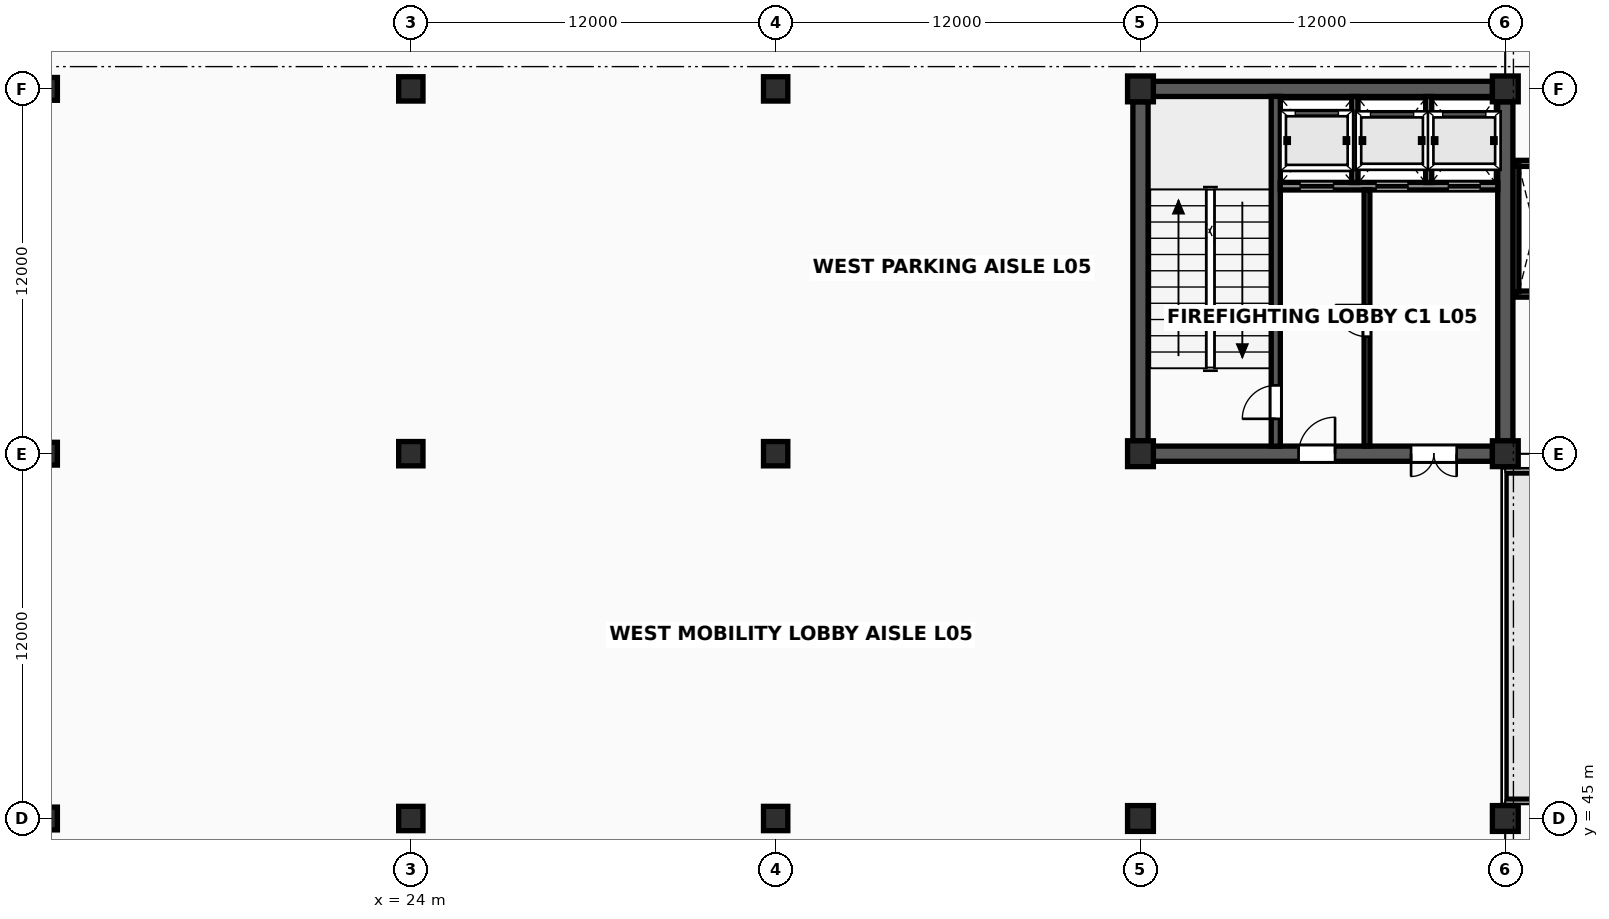
"""IFC4 building model, lengths in metres.
Left out: names, types, materials, properties, quantities, classifications, styles, units other than length and angle.
Written with IfcOpenShell. Run it as: python <this file> out.ifc"""

import sys

from ifc_helpers import new_model, si_unit, direction, frame, frame_2d, origin, origin_2d, place, context, subcontext, project, spatial, rectangle, extrude, element, fill, save


model = new_model("IFC4")
c1 = context("Model", 3, precision=1e-05, world=origin(), true_north=direction((0.0, 1.0)))
c2 = subcontext(c1, "Body", "Model", "MODEL_VIEW")
j1 = project(units=[si_unit("LENGTHUNIT", "METRE"), si_unit("PLANEANGLEUNIT", "RADIAN")], contexts=[c1])
p1 = place(None, origin())
s1 = spatial("IfcSite", under=j1, at=p1, CompositionType="ELEMENT")
p2 = place(p1, origin())
s2 = spatial("IfcBuilding", under=s1, at=p2, CompositionType="ELEMENT")
p3 = place(p2, frame((0.0, 0.0, 21.0)))
s3 = spatial("IfcBuildingStorey", under=s2, at=p3, CompositionType="ELEMENT", Elevation=21.0)
for number, where, z_axis, x_axis in (
    (1, (12.0, 45.0, 0.0), (0.0, 0.0, 1.0), (1.0, 0.0, 0.0)),
    (2, (12.0, 57.0, 0.0), (0.0, 0.0, 1.0), (1.0, 0.0, 0.0)),
    (3, (12.0, 69.0, 0.0), (0.0, 0.0, 1.0), (1.0, 0.0, 0.0)),
):
    element("IfcColumn", number, at=place(p3, frame(where, z_axis=z_axis, x_axis=x_axis)), inside=s3, PredefinedType="COLUMN", context=c2, shape_type="SweptSolid", body=[
        extrude(rectangle(XDim=0.75, YDim=0.75, at=origin_2d()), origin(), (0.0, 0.0, 1.0), 3.8),
    ])
for number, where, z_axis, x_axis in (
    (4, (24.0, 45.0, 0.0), (0.0, 0.0, 1.0), (1.0, 0.0, 0.0)),
    (5, (24.0, 57.0, 0.0), (0.0, 0.0, 1.0), (1.0, 0.0, 0.0)),
    (6, (24.0, 69.0, 0.0), (0.0, 0.0, 1.0), (1.0, 0.0, 0.0)),
    (7, (36.0, 45.0, 0.0), (0.0, 0.0, 1.0), (1.0, 0.0, 0.0)),
    (8, (36.0, 57.0, 0.0), (0.0, 0.0, 1.0), (1.0, 0.0, 0.0)),
    (9, (36.0, 69.0, 0.0), (0.0, 0.0, 1.0), (1.0, 0.0, 0.0)),
):
    element("IfcColumn", number, at=place(p3, frame(where, z_axis=z_axis, x_axis=x_axis)), inside=s3, PredefinedType="COLUMN", context=c2, shape_type="SweptSolid", body=[
        extrude(rectangle(XDim=0.8, YDim=0.8, at=origin_2d()), origin(), (0.0, 0.0, 1.0), 3.8),
    ])
for number, where, z_axis, x_axis in (
    (10, (48.0, 45.0, 0.0), (0.0, 0.0, 1.0), (1.0, 0.0, 0.0)),
    (11, (48.0, 57.0, 0.0), (0.0, 0.0, 1.0), (1.0, 0.0, 0.0)),
    (12, (48.0, 69.0, 0.0), (0.0, 0.0, 1.0), (1.0, 0.0, 0.0)),
    (13, (60.0, 45.0, 0.0), (0.0, 0.0, 1.0), (1.0, 0.0, 0.0)),
    (14, (60.0, 57.0, 0.0), (0.0, 0.0, 1.0), (1.0, 0.0, 0.0)),
    (15, (60.0, 69.0, 0.0), (0.0, 0.0, 1.0), (1.0, 0.0, 0.0)),
):
    element("IfcColumn", number, at=place(p3, frame(where, z_axis=z_axis, x_axis=x_axis)), inside=s3, PredefinedType="COLUMN", context=c2, shape_type="SweptSolid", body=[
        extrude(rectangle(XDim=0.85, YDim=0.85, at=origin_2d()), origin(), (0.0, 0.0, 1.0), 3.8),
    ])
for number, where, z_axis, x_axis in (
    (16, (60.347, 62.25, 0.0), (0.0, 0.0, 1.0), (1.0, 0.0, 0.0)),
    (17, (60.347, 66.55, 0.0), (0.0, 0.0, 1.0), (1.0, 0.0, 0.0)),
):
    element("IfcWall", number, at=place(p3, frame(where, z_axis=z_axis, x_axis=x_axis)), inside=s3, PredefinedType="SOLIDWALL", context=c2, shape_type="SweptSolid", body=[
        extrude(rectangle(XDim=1.233, YDim=0.2, at=frame_2d((0.617, 0.0))), origin(), (0.0, 0.0, 1.0), 3.638),
    ])
p4 = place(p3, frame((60.347, 62.33, 0.0), z_axis=(0.0, 0.0, 1.0), x_axis=(0.0, 1.0, 0.0)))
e18 = element("IfcWall", 18, at=p4, inside=s3, PredefinedType="SOLIDWALL", context=c2, shape_type="SweptSolid", body=[
    extrude(rectangle(XDim=4.14, YDim=0.2, at=frame_2d((2.07, 0.0))), origin(), (0.0, 0.0, 1.0), 3.638),
])
p5 = place(p3, frame((48.422, 57.0, 0.0), z_axis=(0.0, 0.0, 1.0), x_axis=(1.0, 0.0, 0.0)))
e19 = element("IfcWall", 19, at=p5, inside=s3, PredefinedType="SHEAR", context=c2, shape_type="SweptSolid", body=[
    extrude(rectangle(XDim=11.156, YDim=0.5, at=frame_2d((5.578, 0.0))), origin(), (0.0, 0.0, 1.0), 3.638),
])
p6 = place(p5, frame((4.778, 0.0, 0.0)))
e20 = element("IfcOpeningElement", 20, at=p6, cuts=e19, PredefinedType="OPENING", context=c2, shape_type="SweptSolid", body=[
    extrude(rectangle(XDim=1.2, YDim=2.2, at=frame_2d((0.6, 1.1))), frame((0.0, 0.265, 0.0), z_axis=(0.0, -1.0, 0.0), x_axis=(1.0, 0.0, 0.0)), (0.0, 0.0, 1.0), 0.53),
])
p7 = place(p5, frame((8.478, 0.0, 0.0)))
e21 = element("IfcOpeningElement", 21, at=p7, cuts=e19, PredefinedType="OPENING", context=c2, shape_type="SweptSolid", body=[
    extrude(rectangle(XDim=1.5, YDim=2.25, at=frame_2d((0.75, 1.125))), frame((0.0, 0.265, 0.0), z_axis=(0.0, -1.0, 0.0), x_axis=(1.0, 0.0, 0.0)), (0.0, 0.0, 1.0), 0.53),
])
for number, where, z_axis, x_axis in (
    (22, (48.422, 69.0, 0.0), (0.0, 0.0, 1.0), (1.0, 0.0, 0.0)),
    (23, (48.0, 57.422, 0.0), (0.0, 0.0, 1.0), (0.0, 1.0, 0.0)),
    (24, (60.0, 57.422, 0.0), (0.0, 0.0, 1.0), (0.0, 1.0, 0.0)),
):
    element("IfcWall", number, at=place(p3, frame(where, z_axis=z_axis, x_axis=x_axis)), inside=s3, PredefinedType="SHEAR", context=c2, shape_type="SweptSolid", body=[
        extrude(rectangle(XDim=11.156, YDim=0.5, at=frame_2d((5.578, 0.0))), origin(), (0.0, 0.0, 1.0), 3.638),
    ])
p8 = place(p3, frame((52.45, 57.247, 0.0), z_axis=(0.0, 0.0, 1.0), x_axis=(0.0, 1.0, 0.0)))
e25 = element("IfcWall", 25, at=p8, inside=s3, PredefinedType="SHEAR", context=c2, shape_type="SweptSolid", body=[
    extrude(rectangle(XDim=11.506, YDim=0.3, at=frame_2d((5.753, 0.0))), origin(), (0.0, 0.0, 1.0), 3.638),
])
p9 = place(p8, frame((0.9, 0.0, 0.0)))
e26 = element("IfcOpeningElement", 26, at=p9, cuts=e25, PredefinedType="OPENING", context=c2, shape_type="SweptSolid", body=[
    extrude(rectangle(XDim=1.1, YDim=2.2, at=frame_2d((0.55, 1.1))), frame((0.0, 0.165, 0.0), z_axis=(0.0, -1.0, 0.0), x_axis=(1.0, 0.0, 0.0)), (0.0, 0.0, 1.0), 0.33),
])
p10 = place(p3, frame((52.597, 65.8, 0.0), z_axis=(0.0, 0.0, 1.0), x_axis=(1.0, 0.0, 0.0)))
e27 = element("IfcWall", 27, at=p10, inside=s3, PredefinedType="SOLIDWALL", context=c2, shape_type="SweptSolid", body=[
    extrude(rectangle(XDim=7.156, YDim=0.25, at=frame_2d((3.578, 0.0))), origin(), (0.0, 0.0, 1.0), 3.638),
])
p11 = place(p10, frame((0.653, 0.0, 0.0)))
e28 = element("IfcOpeningElement", 28, at=p11, cuts=e27, PredefinedType="OPENING", context=c2, shape_type="SweptSolid", body=[
    extrude(rectangle(XDim=1.1, YDim=2.24, at=frame_2d((0.55, 1.12))), frame((0.0, 0.14, 0.0), z_axis=(0.0, -1.0, 0.0), x_axis=(1.0, 0.0, 0.0)), (0.0, 0.0, 1.0), 0.28),
])
p12 = place(p10, frame((3.153, 0.0, 0.0)))
e29 = element("IfcOpeningElement", 29, at=p12, cuts=e27, PredefinedType="OPENING", context=c2, shape_type="SweptSolid", body=[
    extrude(rectangle(XDim=1.05, YDim=2.2, at=frame_2d((0.525, 1.1))), frame((0.0, 0.14, 0.0), z_axis=(0.0, -1.0, 0.0), x_axis=(1.0, 0.0, 0.0)), (0.0, 0.0, 1.0), 0.28),
])
p13 = place(p10, frame((5.528, 0.0, 0.0)))
e30 = element("IfcOpeningElement", 30, at=p13, cuts=e27, PredefinedType="OPENING", context=c2, shape_type="SweptSolid", body=[
    extrude(rectangle(XDim=1.05, YDim=2.2, at=frame_2d((0.525, 1.1))), frame((0.0, 0.14, 0.0), z_axis=(0.0, -1.0, 0.0), x_axis=(1.0, 0.0, 0.0)), (0.0, 0.0, 1.0), 0.28),
])
for number, where, z_axis, x_axis in (
    (31, (55.05, 65.92, 0.0), (0.0, 0.0, 1.0), (0.0, 1.0, 0.0)),
    (32, (57.48, 65.92, 0.0), (0.0, 0.0, 1.0), (0.0, 1.0, 0.0)),
):
    element("IfcWall", number, at=place(p3, frame(where, z_axis=z_axis, x_axis=x_axis)), inside=s3, PredefinedType="SOLIDWALL", context=c2, shape_type="SweptSolid", body=[
        extrude(rectangle(XDim=2.83, YDim=0.2, at=frame_2d((1.415, 0.0))), origin(), (0.0, 0.0, 1.0), 3.628),
    ])
p14 = place(p3, frame((55.45, 57.25, 0.0), z_axis=(0.0, 0.0, 1.0), x_axis=(0.0, 1.0, 0.0)))
e33 = element("IfcWall", 33, at=p14, inside=s3, PredefinedType="SOLIDWALL", context=c2, shape_type="SweptSolid", body=[
    extrude(rectangle(XDim=8.43, YDim=0.19, at=frame_2d((4.215, 0.0))), origin(), (0.0, 0.0, 1.0), 3.628),
])
p15 = place(p14, frame((3.6, 0.0, 0.0)))
e34 = element("IfcOpeningElement", 34, at=p15, cuts=e33, PredefinedType="OPENING", context=c2, shape_type="SweptSolid", body=[
    extrude(rectangle(XDim=1.04, YDim=2.18, at=frame_2d((0.52, 1.09))), frame((0.0, 0.11, 0.0), z_axis=(0.0, -1.0, 0.0), x_axis=(1.0, 0.0, 0.0)), (0.0, 0.0, 1.0), 0.22),
])
p16 = place(p9, origin())
e35 = element("IfcDoor", 35, at=p16, inside=s3, OperationType="SINGLE_SWING_LEFT", PredefinedType="DOOR", context=c2, shape_type="SweptSolid", body=[
    extrude(rectangle(XDim=1.1, YDim=2.2, at=frame_2d((0.55, 1.1))), frame((0.0, 0.025, 0.0), z_axis=(0.0, -1.0, 0.0), x_axis=(1.0, 0.0, 0.0)), (0.0, 0.0, 1.0), 0.05),
])
fill(e26, e35)
p17 = place(p15, origin())
e36 = element("IfcDoor", 36, at=p17, inside=s3, OperationType="SINGLE_SWING_RIGHT", PredefinedType="DOOR", context=c2, shape_type="SweptSolid", body=[
    extrude(rectangle(XDim=1.04, YDim=2.18, at=frame_2d((0.52, 1.09))), frame((0.0, 0.025, 0.0), z_axis=(0.0, -1.0, 0.0), x_axis=(1.0, 0.0, 0.0)), (0.0, 0.0, 1.0), 0.05),
])
fill(e34, e36)
p18 = place(p6, origin())
e37 = element("IfcDoor", 37, at=p18, inside=s3, OperationType="SINGLE_SWING_RIGHT", PredefinedType="DOOR", context=c2, shape_type="SweptSolid", body=[
    extrude(rectangle(XDim=1.2, YDim=2.2, at=frame_2d((0.6, 1.1))), frame((0.0, 0.025, 0.0), z_axis=(0.0, -1.0, 0.0), x_axis=(1.0, 0.0, 0.0)), (0.0, 0.0, 1.0), 0.05),
])
fill(e20, e37)
p19 = place(p7, origin())
e38 = element("IfcDoor", 38, at=p19, inside=s3, OperationType="DOUBLE_DOOR_SINGLE_SWING", PredefinedType="DOOR", context=c2, shape_type="SweptSolid", body=[
    extrude(rectangle(XDim=1.5, YDim=2.25, at=frame_2d((0.75, 1.125))), frame((0.0, 0.025, 0.0), z_axis=(0.0, -1.0, 0.0), x_axis=(1.0, 0.0, 0.0)), (0.0, 0.0, 1.0), 0.05),
])
fill(e21, e38)
p20 = place(p11, origin())
e39 = element("IfcDoor", 39, at=p20, inside=s3, OperationType="SLIDING_TO_LEFT", PredefinedType="USERDEFINED", context=c2, shape_type="SweptSolid", body=[
    extrude(rectangle(XDim=1.1, YDim=2.24, at=frame_2d((0.55, 1.12))), frame((0.0, 0.025, 0.0), z_axis=(0.0, -1.0, 0.0), x_axis=(1.0, 0.0, 0.0)), (0.0, 0.0, 1.0), 0.05),
])
fill(e28, e39)
p21 = place(p12, origin())
e40 = element("IfcDoor", 40, at=p21, inside=s3, OperationType="SLIDING_TO_LEFT", PredefinedType="USERDEFINED", context=c2, shape_type="SweptSolid", body=[
    extrude(rectangle(XDim=1.05, YDim=2.2, at=frame_2d((0.525, 1.1))), frame((0.0, 0.025, 0.0), z_axis=(0.0, -1.0, 0.0), x_axis=(1.0, 0.0, 0.0)), (0.0, 0.0, 1.0), 0.05),
])
fill(e29, e40)
p22 = place(p13, origin())
e41 = element("IfcDoor", 41, at=p22, inside=s3, OperationType="SLIDING_TO_LEFT", PredefinedType="USERDEFINED", context=c2, shape_type="SweptSolid", body=[
    extrude(rectangle(XDim=1.05, YDim=2.2, at=frame_2d((0.525, 1.1))), frame((0.0, 0.025, 0.0), z_axis=(0.0, -1.0, 0.0), x_axis=(1.0, 0.0, 0.0)), (0.0, 0.0, 1.0), 0.05),
])
fill(e30, e41)
save(model, sys.argv[1])
